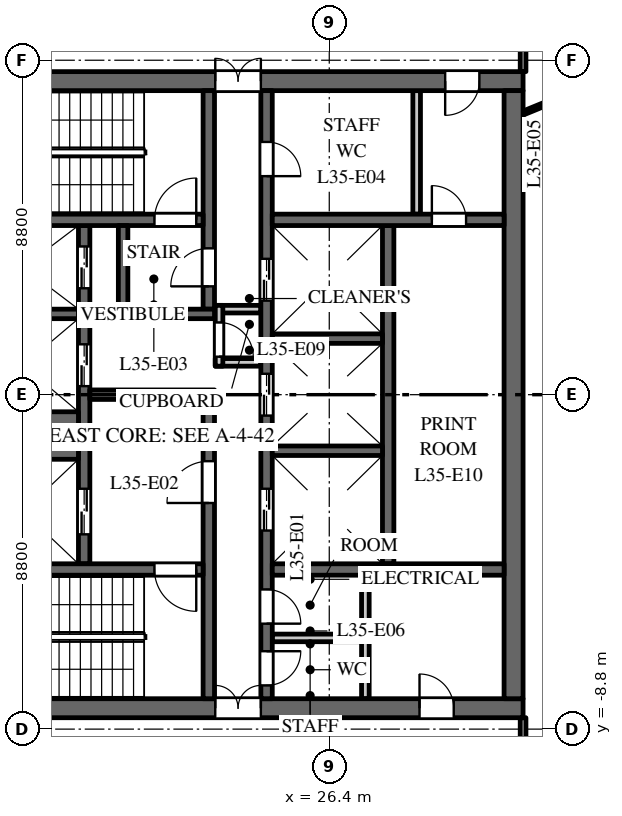
"""IFC4 building model, lengths in metres.
Left out: names, types, materials, properties, quantities, classifications, styles, units other than length and angle.
Written with IfcOpenShell. Run it as: python <this file> out.ifc"""

import sys

from ifc_helpers import new_model, si_unit, direction, frame, frame_2d, origin, place, context, subcontext, project, spatial, rectangle, extrude, element, fill, save


model = new_model("IFC4")
c1 = context("Model", 3, precision=1e-05, world=origin(), true_north=direction((0.0, 1.0)))
c2 = subcontext(c1, "Body", "Model", "MODEL_VIEW")
j1 = project(units=[si_unit("LENGTHUNIT", "METRE"), si_unit("PLANEANGLEUNIT", "RADIAN")], contexts=[c1])
p1 = place(None, origin())
s1 = spatial("IfcSite", under=j1, at=p1, CompositionType="ELEMENT")
p2 = place(p1, origin())
s2 = spatial("IfcBuilding", under=s1, at=p2, CompositionType="ELEMENT")
p3 = place(p2, frame((0.0, 0.0, 154.0)))
s3 = spatial("IfcBuildingStorey", under=s2, at=p3, CompositionType="ELEMENT", Elevation=154.0)
p4 = place(p3, frame((16.5, 8.25, 0.0), z_axis=(0.0, 0.0, 1.0), x_axis=(1.0, 0.0, 0.0)))
e1 = element("IfcWall", 1, at=p4, inside=s3, PredefinedType="SHEAR", context=c2, shape_type="SweptSolid", body=[
    extrude(rectangle(XDim=15.0, YDim=0.5, at=frame_2d((7.5, 0.0))), origin(), (0.0, 0.0, 1.0), 3.7),
])
p5 = place(p4, frame((6.9, 0.0, 0.0)))
e2 = element("IfcOpeningElement", 2, at=p5, cuts=e1, PredefinedType="OPENING", context=c2, shape_type="SweptSolid", body=[
    extrude(rectangle(XDim=1.2, YDim=2.1, at=frame_2d((0.6, 1.05))), frame((0.0, 0.26, 0.0), z_axis=(0.0, -1.0, 0.0), x_axis=(1.0, 0.0, 0.0)), (0.0, 0.0, 1.0), 0.52),
])
p6 = place(p4, frame((12.95, 0.0, 0.0)))
e3 = element("IfcOpeningElement", 3, at=p6, cuts=e1, PredefinedType="OPENING", context=c2, shape_type="SweptSolid", body=[
    extrude(rectangle(XDim=0.9, YDim=2.1, at=frame_2d((0.45, 1.05))), frame((0.0, 0.26, 0.0), z_axis=(0.0, -1.0, 0.0), x_axis=(1.0, 0.0, 0.0)), (0.0, 0.0, 1.0), 0.52),
])
p7 = place(p3, frame((16.5, -8.25, 0.0), z_axis=(0.0, 0.0, 1.0), x_axis=(1.0, 0.0, 0.0)))
e4 = element("IfcWall", 4, at=p7, inside=s3, PredefinedType="SHEAR", context=c2, shape_type="SweptSolid", body=[
    extrude(rectangle(XDim=15.0, YDim=0.5, at=frame_2d((7.5, 0.0))), origin(), (0.0, 0.0, 1.0), 3.7),
])
p8 = place(p7, frame((6.9, 0.0, 0.0)))
e5 = element("IfcOpeningElement", 5, at=p8, cuts=e4, PredefinedType="OPENING", context=c2, shape_type="SweptSolid", body=[
    extrude(rectangle(XDim=1.2, YDim=2.1, at=frame_2d((0.6, 1.05))), frame((0.0, 0.26, 0.0), z_axis=(0.0, -1.0, 0.0), x_axis=(1.0, 0.0, 0.0)), (0.0, 0.0, 1.0), 0.52),
])
p9 = place(p7, frame((12.275, 0.0, 0.0)))
e6 = element("IfcOpeningElement", 6, at=p9, cuts=e4, PredefinedType="OPENING", context=c2, shape_type="SweptSolid", body=[
    extrude(rectangle(XDim=0.9, YDim=2.1, at=frame_2d((0.45, 1.05))), frame((0.0, 0.26, 0.0), z_axis=(0.0, -1.0, 0.0), x_axis=(1.0, 0.0, 0.0)), (0.0, 0.0, 1.0), 0.52),
])
p10 = place(p3, frame((27.95, -4.45, 0.0), z_axis=(0.0, 0.0, 1.0), x_axis=(0.0, 1.0, 0.0)))
e7 = element("IfcWall", 7, at=p10, inside=s3, PredefinedType="SHEAR", context=c2, shape_type="SweptSolid", body=[
    extrude(rectangle(XDim=8.9, YDim=0.3, at=frame_2d((4.45, 0.0))), origin(), (0.0, 0.0, 1.0), 3.7),
])
p11 = place(p3, frame((19.95, -4.45, 0.0), z_axis=(0.0, 0.0, 1.0), x_axis=(0.0, 1.0, 0.0)))
e8 = element("IfcWall", 8, at=p11, inside=s3, PredefinedType="SHEAR", context=c2, shape_type="SweptSolid", body=[
    extrude(rectangle(XDim=8.9, YDim=0.3, at=frame_2d((4.45, 0.0))), origin(), (0.0, 0.0, 1.0), 3.7),
])
p12 = place(p11, frame((0.775, 0.0, 0.0)))
e9 = element("IfcOpeningElement", 9, at=p12, cuts=e8, PredefinedType="OPENING", context=c2, shape_type="SweptSolid", body=[
    extrude(rectangle(XDim=1.2, YDim=2.1, at=frame_2d((0.6, 1.05))), frame((0.0, 0.16, 0.0), z_axis=(0.0, -1.0, 0.0), x_axis=(1.0, 0.0, 0.0)), (0.0, 0.0, 1.0), 0.32),
])
p13 = place(p11, frame((4.675, 0.0, 0.0)))
e10 = element("IfcOpeningElement", 10, at=p13, cuts=e8, PredefinedType="OPENING", context=c2, shape_type="SweptSolid", body=[
    extrude(rectangle(XDim=1.1, YDim=2.1, at=frame_2d((0.55, 1.05))), frame((0.0, 0.16, 0.0), z_axis=(0.0, -1.0, 0.0), x_axis=(1.0, 0.0, 0.0)), (0.0, 0.0, 1.0), 0.32),
])
p14 = place(p11, frame((7.25, 0.0, 0.0)))
e11 = element("IfcOpeningElement", 11, at=p14, cuts=e8, PredefinedType="OPENING", context=c2, shape_type="SweptSolid", body=[
    extrude(rectangle(XDim=1.1, YDim=2.1, at=frame_2d((0.55, 1.05))), frame((0.0, 0.16, 0.0), z_axis=(0.0, -1.0, 0.0), x_axis=(1.0, 0.0, 0.0)), (0.0, 0.0, 1.0), 0.32),
])
p15 = place(p3, frame((24.75, -8.0, 0.0), z_axis=(0.0, 0.0, 1.0), x_axis=(0.0, 1.0, 0.0)))
e12 = element("IfcWall", 12, at=p15, inside=s3, PredefinedType="SHEAR", context=c2, shape_type="SweptSolid", body=[
    extrude(rectangle(XDim=16.0, YDim=0.3, at=frame_2d((8.0, 0.0))), origin(), (0.0, 0.0, 1.0), 3.7),
])
p16 = place(p15, frame((4.425, 0.0, 0.0)))
e13 = element("IfcOpeningElement", 13, at=p16, cuts=e12, PredefinedType="OPENING", context=c2, shape_type="SweptSolid", body=[
    extrude(rectangle(XDim=1.1, YDim=2.1, at=frame_2d((0.55, 1.05))), frame((0.0, 0.16, 0.0), z_axis=(0.0, -1.0, 0.0), x_axis=(1.0, 0.0, 0.0)), (0.0, 0.0, 1.0), 0.32),
])
p17 = place(p15, frame((7.45, 0.0, 0.0)))
e14 = element("IfcOpeningElement", 14, at=p17, cuts=e12, PredefinedType="OPENING", context=c2, shape_type="SweptSolid", body=[
    extrude(rectangle(XDim=1.1, YDim=2.1, at=frame_2d((0.55, 1.05))), frame((0.0, 0.16, 0.0), z_axis=(0.0, -1.0, 0.0), x_axis=(1.0, 0.0, 0.0)), (0.0, 0.0, 1.0), 0.32),
])
p18 = place(p15, frame((10.475, 0.0, 0.0)))
e15 = element("IfcOpeningElement", 15, at=p18, cuts=e12, PredefinedType="OPENING", context=c2, shape_type="SweptSolid", body=[
    extrude(rectangle(XDim=1.1, YDim=2.1, at=frame_2d((0.55, 1.05))), frame((0.0, 0.16, 0.0), z_axis=(0.0, -1.0, 0.0), x_axis=(1.0, 0.0, 0.0)), (0.0, 0.0, 1.0), 0.32),
])
p19 = place(p15, frame((13.75, 0.0, 0.0)))
e16 = element("IfcOpeningElement", 16, at=p19, cuts=e12, PredefinedType="OPENING", context=c2, shape_type="SweptSolid", body=[
    extrude(rectangle(XDim=0.9, YDim=2.1, at=frame_2d((0.45, 1.05))), frame((0.0, 0.16, 0.0), z_axis=(0.0, -1.0, 0.0), x_axis=(1.0, 0.0, 0.0)), (0.0, 0.0, 1.0), 0.32),
])
p20 = place(p15, frame((1.975, 0.0, 0.0)))
e17 = element("IfcOpeningElement", 17, at=p20, cuts=e12, PredefinedType="OPENING", context=c2, shape_type="SweptSolid", body=[
    extrude(rectangle(XDim=0.9, YDim=2.1, at=frame_2d((0.45, 1.05))), frame((0.0, 0.16, 0.0), z_axis=(0.0, -1.0, 0.0), x_axis=(1.0, 0.0, 0.0)), (0.0, 0.0, 1.0), 0.32),
])
p21 = place(p15, frame((0.35, 0.0, 0.0)))
e18 = element("IfcOpeningElement", 18, at=p21, cuts=e12, PredefinedType="OPENING", context=c2, shape_type="SweptSolid", body=[
    extrude(rectangle(XDim=0.9, YDim=2.1, at=frame_2d((0.45, 1.05))), frame((0.0, 0.16, 0.0), z_axis=(0.0, -1.0, 0.0), x_axis=(1.0, 0.0, 0.0)), (0.0, 0.0, 1.0), 0.32),
])
p22 = place(p3, frame((20.1, 0.0, 0.0), z_axis=(0.0, 0.0, 1.0), x_axis=(1.0, 0.0, 0.0)))
e19 = element("IfcWall", 19, at=p22, inside=s3, PredefinedType="SHEAR", context=c2, shape_type="SweptSolid", body=[
    extrude(rectangle(XDim=3.28, YDim=0.25, at=frame_2d((1.64, 0.0))), origin(), (0.0, 0.0, 1.0), 3.7),
])
for number, where, z_axis, x_axis in (
    (20, (23.4, 0.85, 0.0), (0.0, 0.0, 1.0), (1.0, 0.0, 0.0)),
    (21, (23.4, 2.25, 0.0), (0.0, 0.0, 1.0), (1.0, 0.0, 0.0)),
):
    element("IfcWall", number, at=place(p3, frame(where, z_axis=z_axis, x_axis=x_axis)), inside=s3, PredefinedType="PARTITIONING", context=c2, shape_type="SweptSolid", body=[
        extrude(rectangle(XDim=1.2, YDim=0.2, at=frame_2d((0.6, 0.0))), origin(), (0.0, 0.0, 1.0), 3.7),
    ])
p23 = place(p3, frame((23.5, 0.75, 0.0), z_axis=(0.0, 0.0, 1.0), x_axis=(0.0, 1.0, 0.0)))
e22 = element("IfcWall", 22, at=p23, inside=s3, PredefinedType="PARTITIONING", context=c2, shape_type="SweptSolid", body=[
    extrude(rectangle(XDim=1.6, YDim=0.2, at=frame_2d((0.8, 0.0))), origin(), (0.0, 0.0, 1.0), 3.7),
])
p24 = place(p23, frame((0.25, 0.0, 0.0)))
e23 = element("IfcOpeningElement", 23, at=p24, cuts=e22, PredefinedType="OPENING", context=c2, shape_type="SweptSolid", body=[
    extrude(rectangle(XDim=0.9, YDim=2.1, at=frame_2d((0.45, 1.05))), frame((0.0, 0.11, 0.0), z_axis=(0.0, -1.0, 0.0), x_axis=(1.0, 0.0, 0.0)), (0.0, 0.0, 1.0), 0.22),
])
p25 = place(p3, frame((31.25, -8.0, 0.0), z_axis=(0.0, 0.0, 1.0), x_axis=(0.0, 1.0, 0.0)))
e24 = element("IfcWall", 24, at=p25, inside=s3, PredefinedType="SHEAR", context=c2, shape_type="SweptSolid", body=[
    extrude(rectangle(XDim=16.0, YDim=0.5, at=frame_2d((8.0, 0.0))), origin(), (0.0, 0.0, 1.0), 3.7),
])
p26 = place(p3, frame((24.9, 4.6, 0.0), z_axis=(0.0, 0.0, 1.0), x_axis=(1.0, 0.0, 0.0)))
e25 = element("IfcWall", 25, at=p26, inside=s3, PredefinedType="SHEAR", context=c2, shape_type="SweptSolid", body=[
    extrude(rectangle(XDim=6.1, YDim=0.3, at=frame_2d((3.05, 0.0))), origin(), (0.0, 0.0, 1.0), 3.7),
])
p27 = place(p26, frame((4.2, 0.0, 0.0)))
e26 = element("IfcOpeningElement", 26, at=p27, cuts=e25, PredefinedType="OPENING", context=c2, shape_type="SweptSolid", body=[
    extrude(rectangle(XDim=0.9, YDim=2.1, at=frame_2d((0.45, 1.05))), frame((0.0, 0.16, 0.0), z_axis=(0.0, -1.0, 0.0), x_axis=(1.0, 0.0, 0.0)), (0.0, 0.0, 1.0), 0.32),
])
for number, where, z_axis, x_axis in (
    (27, (28.7, 4.75, 0.0), (0.0, 0.0, 1.0), (0.0, 1.0, 0.0)),
    (28, (27.35, -8.0, 0.0), (0.0, 0.0, 1.0), (0.0, 1.0, 0.0)),
):
    element("IfcWall", number, at=place(p3, frame(where, z_axis=z_axis, x_axis=x_axis)), inside=s3, PredefinedType="PARTITIONING", context=c2, shape_type="SweptSolid", body=[
        extrude(rectangle(XDim=3.25, YDim=0.2, at=frame_2d((1.625, 0.0))), origin(), (0.0, 0.0, 1.0), 3.7),
    ])
p28 = place(p3, frame((24.9, -6.4, 0.0), z_axis=(0.0, 0.0, 1.0), x_axis=(1.0, 0.0, 0.0)))
e29 = element("IfcWall", 29, at=p28, inside=s3, PredefinedType="PARTITIONING", context=c2, shape_type="SweptSolid", body=[
    extrude(rectangle(XDim=2.35, YDim=0.2, at=frame_2d((1.175, 0.0))), origin(), (0.0, 0.0, 1.0), 3.7),
])
p29 = place(p3, frame((24.9, -4.6, 0.0), z_axis=(0.0, 0.0, 1.0), x_axis=(1.0, 0.0, 0.0)))
e30 = element("IfcWall", 30, at=p29, inside=s3, PredefinedType="SHEAR", context=c2, shape_type="SweptSolid", body=[
    extrude(rectangle(XDim=6.1, YDim=0.3, at=frame_2d((3.05, 0.0))), origin(), (0.0, 0.0, 1.0), 3.7),
])
p30 = place(p3, frame((16.9, -1.075, 0.0), z_axis=(0.0, 0.0, 1.0), x_axis=(1.0, 0.0, 0.0)))
e31 = element("IfcWall", 31, at=p30, inside=s3, PredefinedType="SHEAR", context=c2, shape_type="SweptSolid", body=[
    extrude(rectangle(XDim=2.9, YDim=1.25, at=frame_2d((1.45, 0.0))), origin(), (0.0, 0.0, 1.0), 3.7),
])
for number, where, z_axis, x_axis in (
    (32, (16.9, 2.125, 0.0), (0.0, 0.0, 1.0), (1.0, 0.0, 0.0)),
    (33, (24.9, -1.475, 0.0), (0.0, 0.0, 1.0), (1.0, 0.0, 0.0)),
    (34, (24.9, 1.475, 0.0), (0.0, 0.0, 1.0), (1.0, 0.0, 0.0)),
):
    element("IfcWall", number, at=place(p3, frame(where, z_axis=z_axis, x_axis=x_axis)), inside=s3, PredefinedType="SHEAR", context=c2, shape_type="SweptSolid", body=[
        extrude(rectangle(XDim=2.9, YDim=0.25, at=frame_2d((1.45, 0.0))), origin(), (0.0, 0.0, 1.0), 3.7),
    ])
p31 = place(p3, frame((23.23, 2.25, 0.0), z_axis=(0.0, 0.0, 1.0), x_axis=(0.0, 1.0, 0.0)))
e35 = element("IfcWall", 35, at=p31, inside=s3, PredefinedType="SHEAR", context=c2, shape_type="SweptSolid", body=[
    extrude(rectangle(XDim=5.75, YDim=0.3, at=frame_2d((2.875, 0.0))), origin(), (0.0, 0.0, 1.0), 3.7),
])
p32 = place(p31, frame((0.6, 0.0, 0.0)))
e36 = element("IfcOpeningElement", 36, at=p32, cuts=e35, PredefinedType="OPENING", context=c2, shape_type="SweptSolid", body=[
    extrude(rectangle(XDim=1.0, YDim=2.1, at=frame_2d((0.5, 1.05))), frame((0.0, 0.16, 0.0), z_axis=(0.0, -1.0, 0.0), x_axis=(1.0, 0.0, 0.0)), (0.0, 0.0, 1.0), 0.32),
])
p33 = place(p3, frame((23.23, -8.0, 0.0), z_axis=(0.0, 0.0, 1.0), x_axis=(0.0, 1.0, 0.0)))
e37 = element("IfcWall", 37, at=p33, inside=s3, PredefinedType="SHEAR", context=c2, shape_type="SweptSolid", body=[
    extrude(rectangle(XDim=7.875, YDim=0.3, at=frame_2d((3.938, 0.0))), origin(), (0.0, 0.0, 1.0), 3.7),
])
p34 = place(p33, frame((5.15, 0.0, 0.0)))
e38 = element("IfcOpeningElement", 38, at=p34, cuts=e37, PredefinedType="OPENING", context=c2, shape_type="SweptSolid", body=[
    extrude(rectangle(XDim=1.1, YDim=2.1, at=frame_2d((0.55, 1.05))), frame((0.0, 0.16, 0.0), z_axis=(0.0, -1.0, 0.0), x_axis=(1.0, 0.0, 0.0)), (0.0, 0.0, 1.0), 0.32),
])
p35 = place(p3, frame((16.9, 4.6, 0.0), z_axis=(0.0, 0.0, 1.0), x_axis=(1.0, 0.0, 0.0)))
e39 = element("IfcWall", 39, at=p35, inside=s3, PredefinedType="SHEAR", context=c2, shape_type="SweptSolid", body=[
    extrude(rectangle(XDim=6.18, YDim=0.3, at=frame_2d((3.09, 0.0))), origin(), (0.0, 0.0, 1.0), 3.7),
])
p36 = place(p35, frame((4.9, 0.0, 0.0)))
e40 = element("IfcOpeningElement", 40, at=p36, cuts=e39, PredefinedType="OPENING", context=c2, shape_type="SweptSolid", body=[
    extrude(rectangle(XDim=1.1, YDim=2.1, at=frame_2d((0.55, 1.05))), frame((0.0, 0.16, 0.0), z_axis=(0.0, -1.0, 0.0), x_axis=(1.0, 0.0, 0.0)), (0.0, 0.0, 1.0), 0.32),
])
p37 = place(p3, frame((16.9, -4.6, 0.0), z_axis=(0.0, 0.0, 1.0), x_axis=(1.0, 0.0, 0.0)))
e41 = element("IfcWall", 41, at=p37, inside=s3, PredefinedType="SHEAR", context=c2, shape_type="SweptSolid", body=[
    extrude(rectangle(XDim=6.18, YDim=0.3, at=frame_2d((3.09, 0.0))), origin(), (0.0, 0.0, 1.0), 3.7),
])
p38 = place(p37, frame((4.9, 0.0, 0.0)))
e42 = element("IfcOpeningElement", 42, at=p38, cuts=e41, PredefinedType="OPENING", context=c2, shape_type="SweptSolid", body=[
    extrude(rectangle(XDim=1.1, YDim=2.1, at=frame_2d((0.55, 1.05))), frame((0.0, 0.16, 0.0), z_axis=(0.0, -1.0, 0.0), x_axis=(1.0, 0.0, 0.0)), (0.0, 0.0, 1.0), 0.32),
])
p39 = place(p3, frame((20.85, 2.125, 0.0), z_axis=(0.0, 0.0, 1.0), x_axis=(1.0, 0.0, 0.0)))
e43 = element("IfcWall", 43, at=p39, inside=s3, PredefinedType="SHEAR", context=c2, shape_type="SweptSolid", body=[
    extrude(rectangle(XDim=2.53, YDim=0.25, at=frame_2d((1.265, 0.0))), origin(), (0.0, 0.0, 1.0), 3.7),
])
p40 = place(p3, frame((20.975, 2.25, 0.0), z_axis=(0.0, 0.0, 1.0), x_axis=(0.0, 1.0, 0.0)))
e44 = element("IfcWall", 44, at=p40, inside=s3, PredefinedType="SHEAR", context=c2, shape_type="SweptSolid", body=[
    extrude(rectangle(XDim=2.2, YDim=0.25, at=frame_2d((1.1, 0.0))), origin(), (0.0, 0.0, 1.0), 3.7),
])
p41 = place(p3, frame((31.5, -10.7, 0.0), z_axis=(0.0, 0.0, 1.0), x_axis=(0.0, 1.0, 0.0)))
e45 = element("IfcWall", 45, at=p41, inside=s3, PredefinedType="PARTITIONING", context=c2, shape_type="SweptSolid", body=[
    extrude(rectangle(XDim=2.2, YDim=0.15, at=frame_2d((1.1, 0.0))), origin(), (0.0, 0.0, 1.0), 2.9),
])
p42 = place(p3, frame((31.5, 7.41, 0.0), z_axis=(0.0, 0.0, 1.0), x_axis=(0.925344112436, 0.379128307542, 0.0)))
e46 = element("IfcWall", 46, at=p42, inside=s3, PredefinedType="PARTITIONING", context=c2, shape_type="SweptSolid", body=[
    extrude(rectangle(XDim=2.954, YDim=0.1, at=frame_2d((1.477, 0.0))), origin(), (0.0, 0.0, 1.0), 3.7),
])
p43 = place(p3, frame((31.5, 8.5, 0.0), z_axis=(0.0, 0.0, 1.0), x_axis=(0.0, 1.0, 0.0)))
e47 = element("IfcWall", 47, at=p43, inside=s3, PredefinedType="PARTITIONING", context=c2, shape_type="SweptSolid", body=[
    extrude(rectangle(XDim=2.2, YDim=0.15, at=frame_2d((1.1, 0.0))), origin(), (0.0, 0.0, 1.0), 2.9),
])
p44 = place(p12, origin())
e48 = element("IfcDoor", 48, at=p44, inside=s3, OperationType="DOUBLE_DOOR_SLIDING", PredefinedType="DOOR", context=c2, shape_type="SweptSolid", body=[
    extrude(rectangle(XDim=1.2, YDim=2.1, at=frame_2d((0.6, 1.05))), frame((0.0, 0.025, 0.0), z_axis=(0.0, -1.0, 0.0), x_axis=(1.0, 0.0, 0.0)), (0.0, 0.0, 1.0), 0.05),
])
fill(e9, e48)
p45 = place(p13, origin())
e49 = element("IfcDoor", 49, at=p45, inside=s3, OperationType="DOUBLE_DOOR_SLIDING", PredefinedType="DOOR", context=c2, shape_type="SweptSolid", body=[
    extrude(rectangle(XDim=1.1, YDim=2.1, at=frame_2d((0.55, 1.05))), frame((0.0, 0.025, 0.0), z_axis=(0.0, -1.0, 0.0), x_axis=(1.0, 0.0, 0.0)), (0.0, 0.0, 1.0), 0.05),
])
fill(e10, e49)
p46 = place(p14, origin())
e50 = element("IfcDoor", 50, at=p46, inside=s3, OperationType="DOUBLE_DOOR_SLIDING", PredefinedType="DOOR", context=c2, shape_type="SweptSolid", body=[
    extrude(rectangle(XDim=1.1, YDim=2.1, at=frame_2d((0.55, 1.05))), frame((0.0, 0.025, 0.0), z_axis=(0.0, -1.0, 0.0), x_axis=(1.0, 0.0, 0.0)), (0.0, 0.0, 1.0), 0.05),
])
fill(e11, e50)
p47 = place(p16, origin())
e51 = element("IfcDoor", 51, at=p47, inside=s3, OperationType="DOUBLE_DOOR_SLIDING", PredefinedType="DOOR", context=c2, shape_type="SweptSolid", body=[
    extrude(rectangle(XDim=1.1, YDim=2.1, at=frame_2d((0.55, 1.05))), frame((0.0, 0.025, 0.0), z_axis=(0.0, -1.0, 0.0), x_axis=(1.0, 0.0, 0.0)), (0.0, 0.0, 1.0), 0.05),
])
fill(e13, e51)
p48 = place(p17, origin())
e52 = element("IfcDoor", 52, at=p48, inside=s3, OperationType="DOUBLE_DOOR_SLIDING", PredefinedType="DOOR", context=c2, shape_type="SweptSolid", body=[
    extrude(rectangle(XDim=1.1, YDim=2.1, at=frame_2d((0.55, 1.05))), frame((0.0, 0.025, 0.0), z_axis=(0.0, -1.0, 0.0), x_axis=(1.0, 0.0, 0.0)), (0.0, 0.0, 1.0), 0.05),
])
fill(e14, e52)
p49 = place(p18, origin())
e53 = element("IfcDoor", 53, at=p49, inside=s3, OperationType="DOUBLE_DOOR_SLIDING", PredefinedType="DOOR", context=c2, shape_type="SweptSolid", body=[
    extrude(rectangle(XDim=1.1, YDim=2.1, at=frame_2d((0.55, 1.05))), frame((0.0, 0.025, 0.0), z_axis=(0.0, -1.0, 0.0), x_axis=(1.0, 0.0, 0.0)), (0.0, 0.0, 1.0), 0.05),
])
fill(e15, e53)
p50 = place(p36, origin())
e54 = element("IfcDoor", 54, at=p50, inside=s3, OperationType="SINGLE_SWING_LEFT", PredefinedType="DOOR", context=c2, shape_type="SweptSolid", body=[
    extrude(rectangle(XDim=1.1, YDim=2.1, at=frame_2d((0.55, 1.05))), frame((0.0, 0.025, 0.0), z_axis=(0.0, -1.0, 0.0), x_axis=(1.0, 0.0, 0.0)), (0.0, 0.0, 1.0), 0.05),
])
fill(e40, e54)
p51 = place(p38, origin())
e55 = element("IfcDoor", 55, at=p51, inside=s3, OperationType="SINGLE_SWING_RIGHT", PredefinedType="DOOR", context=c2, shape_type="SweptSolid", body=[
    extrude(rectangle(XDim=1.1, YDim=2.1, at=frame_2d((0.55, 1.05))), frame((0.0, 0.025, 0.0), z_axis=(0.0, -1.0, 0.0), x_axis=(1.0, 0.0, 0.0)), (0.0, 0.0, 1.0), 0.05),
])
fill(e42, e55)
p52 = place(p34, origin())
e56 = element("IfcDoor", 56, at=p52, inside=s3, OperationType="SINGLE_SWING_RIGHT", PredefinedType="DOOR", context=c2, shape_type="SweptSolid", body=[
    extrude(rectangle(XDim=1.1, YDim=2.1, at=frame_2d((0.55, 1.05))), frame((0.0, 0.025, 0.0), z_axis=(0.0, -1.0, 0.0), x_axis=(1.0, 0.0, 0.0)), (0.0, 0.0, 1.0), 0.05),
])
fill(e38, e56)
p53 = place(p32, origin())
e57 = element("IfcDoor", 57, at=p53, inside=s3, OperationType="SINGLE_SWING_RIGHT", PredefinedType="DOOR", context=c2, shape_type="SweptSolid", body=[
    extrude(rectangle(XDim=1.0, YDim=2.1, at=frame_2d((0.5, 1.05))), frame((0.0, 0.025, 0.0), z_axis=(0.0, -1.0, 0.0), x_axis=(1.0, 0.0, 0.0)), (0.0, 0.0, 1.0), 0.05),
])
fill(e36, e57)
p54 = place(p5, origin())
e58 = element("IfcDoor", 58, at=p54, inside=s3, OperationType="DOUBLE_DOOR_DOUBLE_SWING", PredefinedType="DOOR", context=c2, shape_type="SweptSolid", body=[
    extrude(rectangle(XDim=1.2, YDim=2.1, at=frame_2d((0.6, 1.05))), frame((0.0, 0.025, 0.0), z_axis=(0.0, -1.0, 0.0), x_axis=(1.0, 0.0, 0.0)), (0.0, 0.0, 1.0), 0.05),
])
fill(e2, e58)
p55 = place(p8, origin())
e59 = element("IfcDoor", 59, at=p55, inside=s3, OperationType="DOUBLE_DOOR_DOUBLE_SWING", PredefinedType="DOOR", context=c2, shape_type="SweptSolid", body=[
    extrude(rectangle(XDim=1.2, YDim=2.1, at=frame_2d((0.6, 1.05))), frame((0.0, 0.025, 0.0), z_axis=(0.0, -1.0, 0.0), x_axis=(1.0, 0.0, 0.0)), (0.0, 0.0, 1.0), 0.05),
])
fill(e5, e59)
p56 = place(p19, origin())
e60 = element("IfcDoor", 60, at=p56, inside=s3, OperationType="SINGLE_SWING_LEFT", PredefinedType="DOOR", context=c2, shape_type="SweptSolid", body=[
    extrude(rectangle(XDim=0.9, YDim=2.1, at=frame_2d((0.45, 1.05))), frame((0.0, 0.025, 0.0), z_axis=(0.0, -1.0, 0.0), x_axis=(1.0, 0.0, 0.0)), (0.0, 0.0, 1.0), 0.05),
])
fill(e16, e60)
p57 = place(p6, origin())
e61 = element("IfcDoor", 61, at=p57, inside=s3, OperationType="SINGLE_SWING_LEFT", PredefinedType="DOOR", context=c2, shape_type="SweptSolid", body=[
    extrude(rectangle(XDim=0.9, YDim=2.1, at=frame_2d((0.45, 1.05))), frame((0.0, 0.025, 0.0), z_axis=(0.0, -1.0, 0.0), x_axis=(1.0, 0.0, 0.0)), (0.0, 0.0, 1.0), 0.05),
])
fill(e3, e61)
p58 = place(p20, origin())
e62 = element("IfcDoor", 62, at=p58, inside=s3, OperationType="SINGLE_SWING_LEFT", PredefinedType="DOOR", context=c2, shape_type="SweptSolid", body=[
    extrude(rectangle(XDim=0.9, YDim=2.1, at=frame_2d((0.45, 1.05))), frame((0.0, 0.025, 0.0), z_axis=(0.0, -1.0, 0.0), x_axis=(1.0, 0.0, 0.0)), (0.0, 0.0, 1.0), 0.05),
])
fill(e17, e62)
p59 = place(p21, origin())
e63 = element("IfcDoor", 63, at=p59, inside=s3, OperationType="SINGLE_SWING_RIGHT", PredefinedType="DOOR", context=c2, shape_type="SweptSolid", body=[
    extrude(rectangle(XDim=0.9, YDim=2.1, at=frame_2d((0.45, 1.05))), frame((0.0, 0.025, 0.0), z_axis=(0.0, -1.0, 0.0), x_axis=(1.0, 0.0, 0.0)), (0.0, 0.0, 1.0), 0.05),
])
fill(e18, e63)
p60 = place(p9, origin())
e64 = element("IfcDoor", 64, at=p60, inside=s3, OperationType="SINGLE_SWING_RIGHT", PredefinedType="DOOR", context=c2, shape_type="SweptSolid", body=[
    extrude(rectangle(XDim=0.9, YDim=2.1, at=frame_2d((0.45, 1.05))), frame((0.0, 0.025, 0.0), z_axis=(0.0, -1.0, 0.0), x_axis=(1.0, 0.0, 0.0)), (0.0, 0.0, 1.0), 0.05),
])
fill(e6, e64)
p61 = place(p24, origin())
e65 = element("IfcDoor", 65, at=p61, inside=s3, OperationType="SINGLE_SWING_LEFT", PredefinedType="DOOR", context=c2, shape_type="SweptSolid", body=[
    extrude(rectangle(XDim=0.9, YDim=2.1, at=frame_2d((0.45, 1.05))), frame((0.0, 0.025, 0.0), z_axis=(0.0, -1.0, 0.0), x_axis=(1.0, 0.0, 0.0)), (0.0, 0.0, 1.0), 0.05),
])
fill(e23, e65)
p62 = place(p27, origin())
e66 = element("IfcDoor", 66, at=p62, inside=s3, OperationType="SINGLE_SWING_RIGHT", PredefinedType="DOOR", context=c2, shape_type="SweptSolid", body=[
    extrude(rectangle(XDim=0.9, YDim=2.1, at=frame_2d((0.45, 1.05))), frame((0.0, 0.025, 0.0), z_axis=(0.0, -1.0, 0.0), x_axis=(1.0, 0.0, 0.0)), (0.0, 0.0, 1.0), 0.05),
])
fill(e26, e66)
save(model, sys.argv[1])
